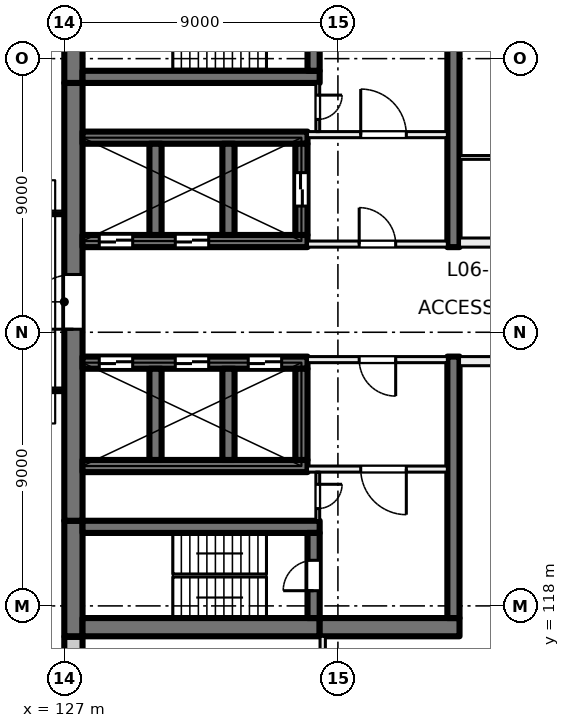
"""IFC4 building model, lengths in metres.
Left out: names, types, materials, properties, quantities, classifications, styles, units other than length and angle.
Written with IfcOpenShell. Run it as: python <this file> out.ifc"""

import sys

from ifc_helpers import new_model, si_unit, direction, frame, frame_2d, origin, place, context, subcontext, project, spatial, rectangle, extrude, element, fill, save


model = new_model("IFC4")
c1 = context("Model", 3, precision=1e-05, world=origin(), true_north=direction((0.0, 1.0)))
c2 = subcontext(c1, "Body", "Model", "MODEL_VIEW")
j1 = project(units=[si_unit("LENGTHUNIT", "METRE"), si_unit("PLANEANGLEUNIT", "RADIAN")], contexts=[c1])
p1 = place(None, origin())
s1 = spatial("IfcSite", under=j1, at=p1, CompositionType="ELEMENT")
p2 = place(p1, origin())
s2 = spatial("IfcBuilding", under=s1, at=p2, CompositionType="ELEMENT")
p3 = place(p2, frame((0.0, 0.0, 31.5)))
s3 = spatial("IfcBuildingStorey", under=s2, at=p3, CompositionType="ELEMENT", Elevation=31.5)
p4 = place(p3, frame((127.3, 117.0, 0.0), z_axis=(0.0, 0.0, 1.0), x_axis=(0.0, 1.0, 0.0)))
e1 = element("IfcWall", 1, at=p4, inside=s3, PredefinedType="SHEAR", context=c2, shape_type="SweptSolid", body=[
    extrude(rectangle(XDim=3.8, YDim=0.6, at=frame_2d((1.9, 0.0))), origin(), (0.0, 0.0, 1.0), 4.0),
])
p5 = place(p3, frame((127.3, 120.8, 0.0), z_axis=(0.0, 0.0, 1.0), x_axis=(0.0, 1.0, 0.0)))
e2 = element("IfcWall", 2, at=p5, inside=s3, PredefinedType="SHEAR", context=c2, shape_type="SweptSolid", body=[
    extrude(rectangle(XDim=14.4, YDim=0.6, at=frame_2d((7.2, 0.0))), origin(), (0.0, 0.0, 1.0), 4.0),
])
p6 = place(p5, frame((6.3, 0.0, 0.0)))
e3 = element("IfcOpeningElement", 3, at=p6, cuts=e2, PredefinedType="OPENING", context=c2, shape_type="SweptSolid", body=[
    extrude(rectangle(XDim=1.8, YDim=2.1, at=frame_2d((0.9, 1.05))), frame((0.0, 0.31, 0.0), z_axis=(0.0, -1.0, 0.0), x_axis=(1.0, 0.0, 0.0)), (0.0, 0.0, 1.0), 0.62),
])
p7 = place(p3, frame((127.3, 135.2, 0.0), z_axis=(0.0, 0.0, 1.0), x_axis=(0.0, 1.0, 0.0)))
e4 = element("IfcWall", 4, at=p7, inside=s3, PredefinedType="SHEAR", context=c2, shape_type="SweptSolid", body=[
    extrude(rectangle(XDim=3.8, YDim=0.6, at=frame_2d((1.9, 0.0))), origin(), (0.0, 0.0, 1.0), 4.0),
])
p8 = place(p3, frame((127.6, 117.3, 0.0), z_axis=(0.0, 0.0, 1.0), x_axis=(1.0, 0.0, 0.0)))
e5 = element("IfcWall", 5, at=p8, inside=s3, PredefinedType="SHEAR", context=c2, shape_type="SweptSolid", body=[
    extrude(rectangle(XDim=7.8, YDim=0.6, at=frame_2d((3.9, 0.0))), origin(), (0.0, 0.0, 1.0), 4.0),
])
p9 = place(p3, frame((135.4, 117.3, 0.0), z_axis=(0.0, 0.0, 1.0), x_axis=(1.0, 0.0, 0.0)))
e6 = element("IfcWall", 6, at=p9, inside=s3, PredefinedType="SHEAR", context=c2, shape_type="SweptSolid", body=[
    extrude(rectangle(XDim=4.6, YDim=0.6, at=frame_2d((2.3, 0.0))), origin(), (0.0, 0.0, 1.0), 4.0),
])
p10 = place(p3, frame((127.6, 120.6, 0.0), z_axis=(0.0, 0.0, 1.0), x_axis=(1.0, 0.0, 0.0)))
e7 = element("IfcWall", 7, at=p10, inside=s3, PredefinedType="SHEAR", context=c2, shape_type="SweptSolid", body=[
    extrude(rectangle(XDim=7.8, YDim=0.4, at=frame_2d((3.9, 0.0))), origin(), (0.0, 0.0, 1.0), 4.0),
])
p11 = place(p3, frame((135.2, 117.6, 0.0), z_axis=(0.0, 0.0, 1.0), x_axis=(0.0, 1.0, 0.0)))
e8 = element("IfcWall", 8, at=p11, inside=s3, PredefinedType="SHEAR", context=c2, shape_type="SweptSolid", body=[
    extrude(rectangle(XDim=2.8, YDim=0.4, at=frame_2d((1.4, 0.0))), origin(), (0.0, 0.0, 1.0), 4.0),
])
p12 = place(p11, frame((0.9, 0.0, 0.0)))
e9 = element("IfcOpeningElement", 9, at=p12, cuts=e8, PredefinedType="OPENING", context=c2, shape_type="SweptSolid", body=[
    extrude(rectangle(XDim=1.0, YDim=2.1, at=frame_2d((0.5, 1.05))), frame((0.0, 0.21, 0.0), z_axis=(0.0, -1.0, 0.0), x_axis=(1.0, 0.0, 0.0)), (0.0, 0.0, 1.0), 0.42),
])
p13 = place(p3, frame((127.6, 135.4, 0.0), z_axis=(0.0, 0.0, 1.0), x_axis=(1.0, 0.0, 0.0)))
e10 = element("IfcWall", 10, at=p13, inside=s3, PredefinedType="SHEAR", context=c2, shape_type="SweptSolid", body=[
    extrude(rectangle(XDim=7.8, YDim=0.4, at=frame_2d((3.9, 0.0))), origin(), (0.0, 0.0, 1.0), 4.0),
])
p14 = place(p3, frame((135.2, 135.6, 0.0), z_axis=(0.0, 0.0, 1.0), x_axis=(0.0, 1.0, 0.0)))
e11 = element("IfcWall", 11, at=p14, inside=s3, PredefinedType="SHEAR", context=c2, shape_type="SweptSolid", body=[
    extrude(rectangle(XDim=2.8, YDim=0.4, at=frame_2d((1.4, 0.0))), origin(), (0.0, 0.0, 1.0), 4.0),
])
p15 = place(p14, frame((0.9, 0.0, 0.0)))
e12 = element("IfcOpeningElement", 12, at=p15, cuts=e11, PredefinedType="OPENING", context=c2, shape_type="SweptSolid", body=[
    extrude(rectangle(XDim=1.0, YDim=2.1, at=frame_2d((0.5, 1.05))), frame((0.0, 0.21, 0.0), z_axis=(0.0, -1.0, 0.0), x_axis=(1.0, 0.0, 0.0)), (0.0, 0.0, 1.0), 0.42),
])
p16 = place(p3, frame((127.6, 126.0, 0.0), z_axis=(0.0, 0.0, 1.0), x_axis=(1.0, 0.0, 0.0)))
e13 = element("IfcWall", 13, at=p16, inside=s3, PredefinedType="SHEAR", context=c2, shape_type="SweptSolid", body=[
    extrude(rectangle(XDim=7.4, YDim=0.4, at=frame_2d((3.7, 0.0))), origin(), (0.0, 0.0, 1.0), 4.0),
])
p17 = place(p16, frame((0.55, 0.0, 0.0)))
e14 = element("IfcOpeningElement", 14, at=p17, cuts=e13, PredefinedType="OPENING", context=c2, shape_type="SweptSolid", body=[
    extrude(rectangle(XDim=1.1, YDim=2.1, at=frame_2d((0.55, 1.05))), frame((0.0, 0.21, 0.0), z_axis=(0.0, -1.0, 0.0), x_axis=(1.0, 0.0, 0.0)), (0.0, 0.0, 1.0), 0.42),
])
p18 = place(p16, frame((3.05, 0.0, 0.0)))
e15 = element("IfcOpeningElement", 15, at=p18, cuts=e13, PredefinedType="OPENING", context=c2, shape_type="SweptSolid", body=[
    extrude(rectangle(XDim=1.1, YDim=2.1, at=frame_2d((0.55, 1.05))), frame((0.0, 0.21, 0.0), z_axis=(0.0, -1.0, 0.0), x_axis=(1.0, 0.0, 0.0)), (0.0, 0.0, 1.0), 0.42),
])
p19 = place(p16, frame((5.45, 0.0, 0.0)))
e16 = element("IfcOpeningElement", 16, at=p19, cuts=e13, PredefinedType="OPENING", context=c2, shape_type="SweptSolid", body=[
    extrude(rectangle(XDim=1.1, YDim=2.1, at=frame_2d((0.55, 1.05))), frame((0.0, 0.21, 0.0), z_axis=(0.0, -1.0, 0.0), x_axis=(1.0, 0.0, 0.0)), (0.0, 0.0, 1.0), 0.42),
])
p20 = place(p3, frame((127.6, 122.6, 0.0), z_axis=(0.0, 0.0, 1.0), x_axis=(1.0, 0.0, 0.0)))
e17 = element("IfcWall", 17, at=p20, inside=s3, PredefinedType="SHEAR", context=c2, shape_type="SweptSolid", body=[
    extrude(rectangle(XDim=7.4, YDim=0.4, at=frame_2d((3.7, 0.0))), origin(), (0.0, 0.0, 1.0), 4.0),
])
for number, where, z_axis, x_axis in (
    (18, (130.0, 122.8, 0.0), (0.0, 0.0, 1.0), (0.0, 1.0, 0.0)),
    (19, (132.4, 122.8, 0.0), (0.0, 0.0, 1.0), (0.0, 1.0, 0.0)),
    (20, (134.8, 122.8, 0.0), (0.0, 0.0, 1.0), (0.0, 1.0, 0.0)),
):
    element("IfcWall", number, at=place(p3, frame(where, z_axis=z_axis, x_axis=x_axis)), inside=s3, PredefinedType="SHEAR", context=c2, shape_type="SweptSolid", body=[
        extrude(rectangle(XDim=3.0, YDim=0.4, at=frame_2d((1.5, 0.0))), origin(), (0.0, 0.0, 1.0), 4.0),
    ])
p21 = place(p3, frame((127.6, 130.0, 0.0), z_axis=(0.0, 0.0, 1.0), x_axis=(1.0, 0.0, 0.0)))
e21 = element("IfcWall", 21, at=p21, inside=s3, PredefinedType="SHEAR", context=c2, shape_type="SweptSolid", body=[
    extrude(rectangle(XDim=7.4, YDim=0.4, at=frame_2d((3.7, 0.0))), origin(), (0.0, 0.0, 1.0), 4.0),
])
p22 = place(p21, frame((0.55, 0.0, 0.0)))
e22 = element("IfcOpeningElement", 22, at=p22, cuts=e21, PredefinedType="OPENING", context=c2, shape_type="SweptSolid", body=[
    extrude(rectangle(XDim=1.1, YDim=2.1, at=frame_2d((0.55, 1.05))), frame((0.0, 0.21, 0.0), z_axis=(0.0, -1.0, 0.0), x_axis=(1.0, 0.0, 0.0)), (0.0, 0.0, 1.0), 0.42),
])
p23 = place(p21, frame((3.05, 0.0, 0.0)))
e23 = element("IfcOpeningElement", 23, at=p23, cuts=e21, PredefinedType="OPENING", context=c2, shape_type="SweptSolid", body=[
    extrude(rectangle(XDim=1.1, YDim=2.1, at=frame_2d((0.55, 1.05))), frame((0.0, 0.21, 0.0), z_axis=(0.0, -1.0, 0.0), x_axis=(1.0, 0.0, 0.0)), (0.0, 0.0, 1.0), 0.42),
])
p24 = place(p3, frame((127.6, 133.4, 0.0), z_axis=(0.0, 0.0, 1.0), x_axis=(1.0, 0.0, 0.0)))
e24 = element("IfcWall", 24, at=p24, inside=s3, PredefinedType="SHEAR", context=c2, shape_type="SweptSolid", body=[
    extrude(rectangle(XDim=7.4, YDim=0.4, at=frame_2d((3.7, 0.0))), origin(), (0.0, 0.0, 1.0), 4.0),
])
for number, where, z_axis, x_axis in (
    (25, (130.0, 130.2, 0.0), (0.0, 0.0, 1.0), (0.0, 1.0, 0.0)),
    (26, (132.4, 130.2, 0.0), (0.0, 0.0, 1.0), (0.0, 1.0, 0.0)),
):
    element("IfcWall", number, at=place(p3, frame(where, z_axis=z_axis, x_axis=x_axis)), inside=s3, PredefinedType="SHEAR", context=c2, shape_type="SweptSolid", body=[
        extrude(rectangle(XDim=3.0, YDim=0.4, at=frame_2d((1.5, 0.0))), origin(), (0.0, 0.0, 1.0), 4.0),
    ])
p25 = place(p3, frame((134.8, 130.2, 0.0), z_axis=(0.0, 0.0, 1.0), x_axis=(0.0, 1.0, 0.0)))
e27 = element("IfcWall", 27, at=p25, inside=s3, PredefinedType="SHEAR", context=c2, shape_type="SweptSolid", body=[
    extrude(rectangle(XDim=3.0, YDim=0.4, at=frame_2d((1.5, 0.0))), origin(), (0.0, 0.0, 1.0), 4.0),
])
p26 = place(p25, frame((0.95, 0.0, 0.0)))
e28 = element("IfcOpeningElement", 28, at=p26, cuts=e27, PredefinedType="OPENING", context=c2, shape_type="SweptSolid", body=[
    extrude(rectangle(XDim=1.1, YDim=2.1, at=frame_2d((0.55, 1.05))), frame((0.0, 0.21, 0.0), z_axis=(0.0, -1.0, 0.0), x_axis=(1.0, 0.0, 0.0)), (0.0, 0.0, 1.0), 0.42),
])
for number, where, z_axis, x_axis in (
    (29, (139.8, 117.6, 0.0), (0.0, 0.0, 1.0), (0.0, 1.0, 0.0)),
    (30, (139.8, 129.8, 0.0), (0.0, 0.0, 1.0), (0.0, 1.0, 0.0)),
):
    element("IfcWall", number, at=place(p3, frame(where, z_axis=z_axis, x_axis=x_axis)), inside=s3, PredefinedType="SHEAR", context=c2, shape_type="SweptSolid", body=[
        extrude(rectangle(XDim=8.6, YDim=0.4, at=frame_2d((4.3, 0.0))), origin(), (0.0, 0.0, 1.0), 4.0),
    ])
p27 = place(p3, frame((127.3, 114.07, 0.0), z_axis=(0.0, 0.0, 1.0), x_axis=(0.0, 1.0, 0.0)))
e31 = element("IfcWall", 31, at=p27, inside=s3, PredefinedType="SOLIDWALL", context=c2, shape_type="SweptSolid", body=[
    extrude(rectangle(XDim=2.91, YDim=0.6, at=frame_2d((1.455, 0.0))), origin(), (0.0, 0.0, 1.0), 3.625),
])
p28 = place(p3, frame((135.0, 129.9, 0.0), z_axis=(0.0, 0.0, 1.0), x_axis=(1.0, 0.0, 0.0)))
e32 = element("IfcWall", 32, at=p28, inside=s3, PredefinedType="PARTITIONING", context=c2, shape_type="SweptSolid", body=[
    extrude(rectangle(XDim=4.6, YDim=0.2, at=frame_2d((2.3, 0.0))), origin(), (0.0, 0.0, 1.0), 3.625),
])
p29 = place(p28, frame((1.7, 0.0, 0.0)))
e33 = element("IfcOpeningElement", 33, at=p29, cuts=e32, PredefinedType="OPENING", context=c2, shape_type="SweptSolid", body=[
    extrude(rectangle(XDim=1.2, YDim=2.1, at=frame_2d((0.6, 1.05))), frame((0.0, 0.11, 0.0), z_axis=(0.0, -1.0, 0.0), x_axis=(1.0, 0.0, 0.0)), (0.0, 0.0, 1.0), 0.22),
])
p30 = place(p3, frame((135.0, 133.5, 0.0), z_axis=(0.0, 0.0, 1.0), x_axis=(1.0, 0.0, 0.0)))
e34 = element("IfcWall", 34, at=p30, inside=s3, PredefinedType="PARTITIONING", context=c2, shape_type="SweptSolid", body=[
    extrude(rectangle(XDim=4.6, YDim=0.2, at=frame_2d((2.3, 0.0))), origin(), (0.0, 0.0, 1.0), 3.625),
])
p31 = place(p30, frame((1.75, 0.0, 0.0)))
e35 = element("IfcOpeningElement", 35, at=p31, cuts=e34, PredefinedType="OPENING", context=c2, shape_type="SweptSolid", body=[
    extrude(rectangle(XDim=1.5, YDim=2.1, at=frame_2d((0.75, 1.05))), frame((0.0, 0.11, 0.0), z_axis=(0.0, -1.0, 0.0), x_axis=(1.0, 0.0, 0.0)), (0.0, 0.0, 1.0), 0.22),
])
p32 = place(p3, frame((135.337, 135.2, 0.0), z_axis=(0.0, 0.0, 1.0), x_axis=(0.0, -1.0, 0.0)))
e36 = element("IfcWall", 36, at=p32, inside=s3, PredefinedType="PARTITIONING", context=c2, shape_type="SweptSolid", body=[
    extrude(rectangle(XDim=1.6, YDim=0.125, at=frame_2d((0.8, 0.0))), origin(), (0.0, 0.0, 1.0), 3.625),
])
p33 = place(p32, frame((0.4, 0.0, 0.0)))
e37 = element("IfcOpeningElement", 37, at=p33, cuts=e36, PredefinedType="OPENING", context=c2, shape_type="SweptSolid", body=[
    extrude(rectangle(XDim=0.8, YDim=2.1, at=frame_2d((0.4, 1.05))), frame((0.0, 0.073, 0.0), z_axis=(0.0, -1.0, 0.0), x_axis=(1.0, 0.0, 0.0)), (0.0, 0.0, 1.0), 0.145),
])
p34 = place(p3, frame((139.6, 126.1, 0.0), z_axis=(0.0, 0.0, 1.0), x_axis=(-1.0, 0.0, 0.0)))
e38 = element("IfcWall", 38, at=p34, inside=s3, PredefinedType="PARTITIONING", context=c2, shape_type="SweptSolid", body=[
    extrude(rectangle(XDim=4.6, YDim=0.2, at=frame_2d((2.3, 0.0))), origin(), (0.0, 0.0, 1.0), 3.625),
])
p35 = place(p34, frame((1.7, 0.0, 0.0)))
e39 = element("IfcOpeningElement", 39, at=p35, cuts=e38, PredefinedType="OPENING", context=c2, shape_type="SweptSolid", body=[
    extrude(rectangle(XDim=1.2, YDim=2.1, at=frame_2d((0.6, 1.05))), frame((0.0, 0.11, 0.0), z_axis=(0.0, -1.0, 0.0), x_axis=(1.0, 0.0, 0.0)), (0.0, 0.0, 1.0), 0.22),
])
p36 = place(p3, frame((139.6, 122.5, 0.0), z_axis=(0.0, 0.0, 1.0), x_axis=(-1.0, 0.0, 0.0)))
e40 = element("IfcWall", 40, at=p36, inside=s3, PredefinedType="PARTITIONING", context=c2, shape_type="SweptSolid", body=[
    extrude(rectangle(XDim=4.6, YDim=0.2, at=frame_2d((2.3, 0.0))), origin(), (0.0, 0.0, 1.0), 3.625),
])
p37 = place(p36, frame((1.35, 0.0, 0.0)))
e41 = element("IfcOpeningElement", 41, at=p37, cuts=e40, PredefinedType="OPENING", context=c2, shape_type="SweptSolid", body=[
    extrude(rectangle(XDim=1.5, YDim=2.1, at=frame_2d((0.75, 1.05))), frame((0.0, 0.11, 0.0), z_axis=(0.0, -1.0, 0.0), x_axis=(1.0, 0.0, 0.0)), (0.0, 0.0, 1.0), 0.22),
])
p38 = place(p3, frame((135.337, 122.4, 0.0), z_axis=(0.0, 0.0, 1.0), x_axis=(0.0, -1.0, 0.0)))
e42 = element("IfcWall", 42, at=p38, inside=s3, PredefinedType="PARTITIONING", context=c2, shape_type="SweptSolid", body=[
    extrude(rectangle(XDim=1.6, YDim=0.125, at=frame_2d((0.8, 0.0))), origin(), (0.0, 0.0, 1.0), 3.625),
])
p39 = place(p38, frame((0.4, 0.0, 0.0)))
e43 = element("IfcOpeningElement", 43, at=p39, cuts=e42, PredefinedType="OPENING", context=c2, shape_type="SweptSolid", body=[
    extrude(rectangle(XDim=0.8, YDim=2.1, at=frame_2d((0.4, 1.05))), frame((0.0, 0.073, 0.0), z_axis=(0.0, -1.0, 0.0), x_axis=(1.0, 0.0, 0.0)), (0.0, 0.0, 1.0), 0.145),
])
p40 = place(p3, frame((135.5, 117.0, 0.0), z_axis=(0.0, 0.0, 1.0), x_axis=(0.0, -1.0, 0.0)))
e44 = element("IfcWall", 44, at=p40, inside=s3, PredefinedType="PARTITIONING", context=c2, shape_type="SweptSolid", body=[
    extrude(rectangle(XDim=6.4, YDim=0.175, at=frame_2d((3.2, 0.0))), origin(), (0.0, 0.0, 1.0), 3.625),
])
p41 = place(p40, frame((2.6, 0.0, 0.0)))
e45 = element("IfcOpeningElement", 45, at=p41, cuts=e44, PredefinedType="OPENING", context=c2, shape_type="SweptSolid", body=[
    extrude(rectangle(XDim=1.2, YDim=2.1, at=frame_2d((0.6, 1.05))), frame((0.0, 0.097, 0.0), z_axis=(0.0, -1.0, 0.0), x_axis=(1.0, 0.0, 0.0)), (0.0, 0.0, 1.0), 0.195),
])
p42 = place(p3, frame((140.0, 129.95, 0.0), z_axis=(0.0, 0.0, 1.0), x_axis=(1.0, 0.0, 0.0)))
e46 = element("IfcWall", 46, at=p42, inside=s3, PredefinedType="PARTITIONING", context=c2, shape_type="SweptSolid", body=[
    extrude(rectangle(XDim=14.0, YDim=0.3, at=frame_2d((7.0, 0.0))), origin(), (0.0, 0.0, 1.0), 3.625),
])
p43 = place(p42, frame((5.25, 0.0, 0.0)))
e47 = element("IfcOpeningElement", 47, at=p43, cuts=e46, PredefinedType="OPENING", context=c2, shape_type="SweptSolid", body=[
    extrude(rectangle(XDim=1.0, YDim=2.1, at=frame_2d((0.5, 1.05))), frame((0.0, 0.16, 0.0), z_axis=(0.0, -1.0, 0.0), x_axis=(1.0, 0.0, 0.0)), (0.0, 0.0, 1.0), 0.32),
])
p44 = place(p42, frame((10.6, 0.0, 0.0)))
e48 = element("IfcOpeningElement", 48, at=p44, cuts=e46, PredefinedType="OPENING", context=c2, shape_type="SweptSolid", body=[
    extrude(rectangle(XDim=1.8, YDim=2.1, at=frame_2d((0.9, 1.05))), frame((0.0, 0.16, 0.0), z_axis=(0.0, -1.0, 0.0), x_axis=(1.0, 0.0, 0.0)), (0.0, 0.0, 1.0), 0.32),
])
p45 = place(p3, frame((140.0, 132.75, 0.0), z_axis=(0.0, 0.0, 1.0), x_axis=(1.0, 0.0, 0.0)))
e49 = element("IfcWall", 49, at=p45, inside=s3, PredefinedType="PARTITIONING", context=c2, shape_type="SweptSolid", body=[
    extrude(rectangle(XDim=8.938, YDim=0.125, at=frame_2d((4.469, 0.0))), origin(), (0.0, 0.0, 1.0), 3.625),
])
p46 = place(p45, frame((6.329, 0.0, 0.0)))
e50 = element("IfcOpeningElement", 50, at=p46, cuts=e49, PredefinedType="OPENING", context=c2, shape_type="SweptSolid", body=[
    extrude(rectangle(XDim=0.8, YDim=2.1, at=frame_2d((0.4, 1.05))), frame((0.0, 0.073, 0.0), z_axis=(0.0, -1.0, 0.0), x_axis=(1.0, 0.0, 0.0)), (0.0, 0.0, 1.0), 0.145),
])
p47 = place(p45, frame((3.1, 0.0, 0.0)))
e51 = element("IfcOpeningElement", 51, at=p47, cuts=e49, PredefinedType="OPENING", context=c2, shape_type="SweptSolid", body=[
    extrude(rectangle(XDim=0.8, YDim=2.1, at=frame_2d((0.4, 1.05))), frame((0.0, 0.073, 0.0), z_axis=(0.0, -1.0, 0.0), x_axis=(1.0, 0.0, 0.0)), (0.0, 0.0, 1.0), 0.145),
])
p48 = place(p3, frame((154.0, 126.05, 0.0), z_axis=(0.0, 0.0, 1.0), x_axis=(-1.0, 0.0, 0.0)))
e52 = element("IfcWall", 52, at=p48, inside=s3, PredefinedType="PARTITIONING", context=c2, shape_type="SweptSolid", body=[
    extrude(rectangle(XDim=14.0, YDim=0.3, at=frame_2d((7.0, 0.0))), origin(), (0.0, 0.0, 1.0), 3.625),
])
p49 = place(p48, frame((6.1, 0.0, 0.0)))
e53 = element("IfcOpeningElement", 53, at=p49, cuts=e52, PredefinedType="OPENING", context=c2, shape_type="SweptSolid", body=[
    extrude(rectangle(XDim=1.8, YDim=2.1, at=frame_2d((0.9, 1.05))), frame((0.0, 0.16, 0.0), z_axis=(0.0, -1.0, 0.0), x_axis=(1.0, 0.0, 0.0)), (0.0, 0.0, 1.0), 0.32),
])
p50 = place(p22, origin())
e54 = element("IfcDoor", 54, at=p50, inside=s3, OperationType="DOUBLE_DOOR_SLIDING", PredefinedType="DOOR", context=c2, shape_type="SweptSolid", body=[
    extrude(rectangle(XDim=1.1, YDim=2.1, at=frame_2d((0.55, 1.05))), frame((0.0, 0.025, 0.0), z_axis=(0.0, -1.0, 0.0), x_axis=(1.0, 0.0, 0.0)), (0.0, 0.0, 1.0), 0.05),
])
fill(e22, e54)
p51 = place(p23, origin())
e55 = element("IfcDoor", 55, at=p51, inside=s3, OperationType="DOUBLE_DOOR_SLIDING", PredefinedType="DOOR", context=c2, shape_type="SweptSolid", body=[
    extrude(rectangle(XDim=1.1, YDim=2.1, at=frame_2d((0.55, 1.05))), frame((0.0, 0.025, 0.0), z_axis=(0.0, -1.0, 0.0), x_axis=(1.0, 0.0, 0.0)), (0.0, 0.0, 1.0), 0.05),
])
fill(e23, e55)
p52 = place(p17, origin())
e56 = element("IfcDoor", 56, at=p52, inside=s3, OperationType="DOUBLE_DOOR_SLIDING", PredefinedType="DOOR", context=c2, shape_type="SweptSolid", body=[
    extrude(rectangle(XDim=1.1, YDim=2.1, at=frame_2d((0.55, 1.05))), frame((0.0, 0.025, 0.0), z_axis=(0.0, -1.0, 0.0), x_axis=(1.0, 0.0, 0.0)), (0.0, 0.0, 1.0), 0.05),
])
fill(e14, e56)
p53 = place(p18, origin())
e57 = element("IfcDoor", 57, at=p53, inside=s3, OperationType="DOUBLE_DOOR_SLIDING", PredefinedType="DOOR", context=c2, shape_type="SweptSolid", body=[
    extrude(rectangle(XDim=1.1, YDim=2.1, at=frame_2d((0.55, 1.05))), frame((0.0, 0.025, 0.0), z_axis=(0.0, -1.0, 0.0), x_axis=(1.0, 0.0, 0.0)), (0.0, 0.0, 1.0), 0.05),
])
fill(e15, e57)
p54 = place(p19, origin())
e58 = element("IfcDoor", 58, at=p54, inside=s3, OperationType="DOUBLE_DOOR_SLIDING", PredefinedType="DOOR", context=c2, shape_type="SweptSolid", body=[
    extrude(rectangle(XDim=1.1, YDim=2.1, at=frame_2d((0.55, 1.05))), frame((0.0, 0.025, 0.0), z_axis=(0.0, -1.0, 0.0), x_axis=(1.0, 0.0, 0.0)), (0.0, 0.0, 1.0), 0.05),
])
fill(e16, e58)
p55 = place(p29, origin())
e59 = element("IfcDoor", 59, at=p55, inside=s3, OperationType="DOUBLE_DOOR_SINGLE_SWING", PredefinedType="DOOR", context=c2, shape_type="SweptSolid", body=[
    extrude(rectangle(XDim=1.2, YDim=2.1, at=frame_2d((0.6, 1.05))), frame((0.0, 0.025, 0.0), z_axis=(0.0, -1.0, 0.0), x_axis=(1.0, 0.0, 0.0)), (0.0, 0.0, 1.0), 0.05),
])
fill(e33, e59)
p56 = place(p31, origin())
e60 = element("IfcDoor", 60, at=p56, inside=s3, OperationType="DOUBLE_DOOR_SINGLE_SWING", PredefinedType="DOOR", context=c2, shape_type="SweptSolid", body=[
    extrude(rectangle(XDim=1.5, YDim=2.1, at=frame_2d((0.75, 1.05))), frame((0.0, 0.025, 0.0), z_axis=(0.0, -1.0, 0.0), x_axis=(1.0, 0.0, 0.0)), (0.0, 0.0, 1.0), 0.05),
])
fill(e35, e60)
p57 = place(p33, origin())
e61 = element("IfcDoor", 61, at=p57, inside=s3, OperationType="SINGLE_SWING_RIGHT", PredefinedType="DOOR", context=c2, shape_type="SweptSolid", body=[
    extrude(rectangle(XDim=0.8, YDim=2.1, at=frame_2d((0.4, 1.05))), frame((0.0, 0.025, 0.0), z_axis=(0.0, -1.0, 0.0), x_axis=(1.0, 0.0, 0.0)), (0.0, 0.0, 1.0), 0.05),
])
fill(e37, e61)
p58 = place(p35, origin())
e62 = element("IfcDoor", 62, at=p58, inside=s3, OperationType="DOUBLE_DOOR_SINGLE_SWING", PredefinedType="DOOR", context=c2, shape_type="SweptSolid", body=[
    extrude(rectangle(XDim=1.2, YDim=2.1, at=frame_2d((0.6, 1.05))), frame((0.0, 0.025, 0.0), z_axis=(0.0, -1.0, 0.0), x_axis=(1.0, 0.0, 0.0)), (0.0, 0.0, 1.0), 0.05),
])
fill(e39, e62)
p59 = place(p37, origin())
e63 = element("IfcDoor", 63, at=p59, inside=s3, OperationType="DOUBLE_DOOR_SINGLE_SWING", PredefinedType="DOOR", context=c2, shape_type="SweptSolid", body=[
    extrude(rectangle(XDim=1.5, YDim=2.1, at=frame_2d((0.75, 1.05))), frame((0.0, 0.025, 0.0), z_axis=(0.0, -1.0, 0.0), x_axis=(1.0, 0.0, 0.0)), (0.0, 0.0, 1.0), 0.05),
])
fill(e41, e63)
p60 = place(p12, origin())
e64 = element("IfcDoor", 64, at=p60, inside=s3, OperationType="SINGLE_SWING_RIGHT", PredefinedType="DOOR", context=c2, shape_type="SweptSolid", body=[
    extrude(rectangle(XDim=1.0, YDim=2.1, at=frame_2d((0.5, 1.05))), frame((0.0, 0.025, 0.0), z_axis=(0.0, -1.0, 0.0), x_axis=(1.0, 0.0, 0.0)), (0.0, 0.0, 1.0), 0.05),
])
fill(e9, e64)
p61 = place(p39, origin())
e65 = element("IfcDoor", 65, at=p61, inside=s3, OperationType="SINGLE_SWING_LEFT", PredefinedType="DOOR", context=c2, shape_type="SweptSolid", body=[
    extrude(rectangle(XDim=0.8, YDim=2.1, at=frame_2d((0.4, 1.05))), frame((0.0, 0.025, 0.0), z_axis=(0.0, -1.0, 0.0), x_axis=(1.0, 0.0, 0.0)), (0.0, 0.0, 1.0), 0.05),
])
fill(e43, e65)
p62 = place(p26, origin())
e66 = element("IfcDoor", 66, at=p62, inside=s3, OperationType="DOUBLE_DOOR_SLIDING", PredefinedType="DOOR", context=c2, shape_type="SweptSolid", body=[
    extrude(rectangle(XDim=1.1, YDim=2.1, at=frame_2d((0.55, 1.05))), frame((0.0, 0.025, 0.0), z_axis=(0.0, -1.0, 0.0), x_axis=(1.0, 0.0, 0.0)), (0.0, 0.0, 1.0), 0.05),
])
fill(e28, e66)
p63 = place(p6, origin())
e67 = element("IfcDoor", 67, at=p63, inside=s3, OperationType="DOUBLE_DOOR_SINGLE_SWING", PredefinedType="DOOR", context=c2, shape_type="SweptSolid", body=[
    extrude(rectangle(XDim=1.8, YDim=2.1, at=frame_2d((0.9, 1.05))), frame((0.0, 0.025, 0.0), z_axis=(0.0, -1.0, 0.0), x_axis=(1.0, 0.0, 0.0)), (0.0, 0.0, 1.0), 0.05),
])
fill(e3, e67)
save(model, sys.argv[1])
